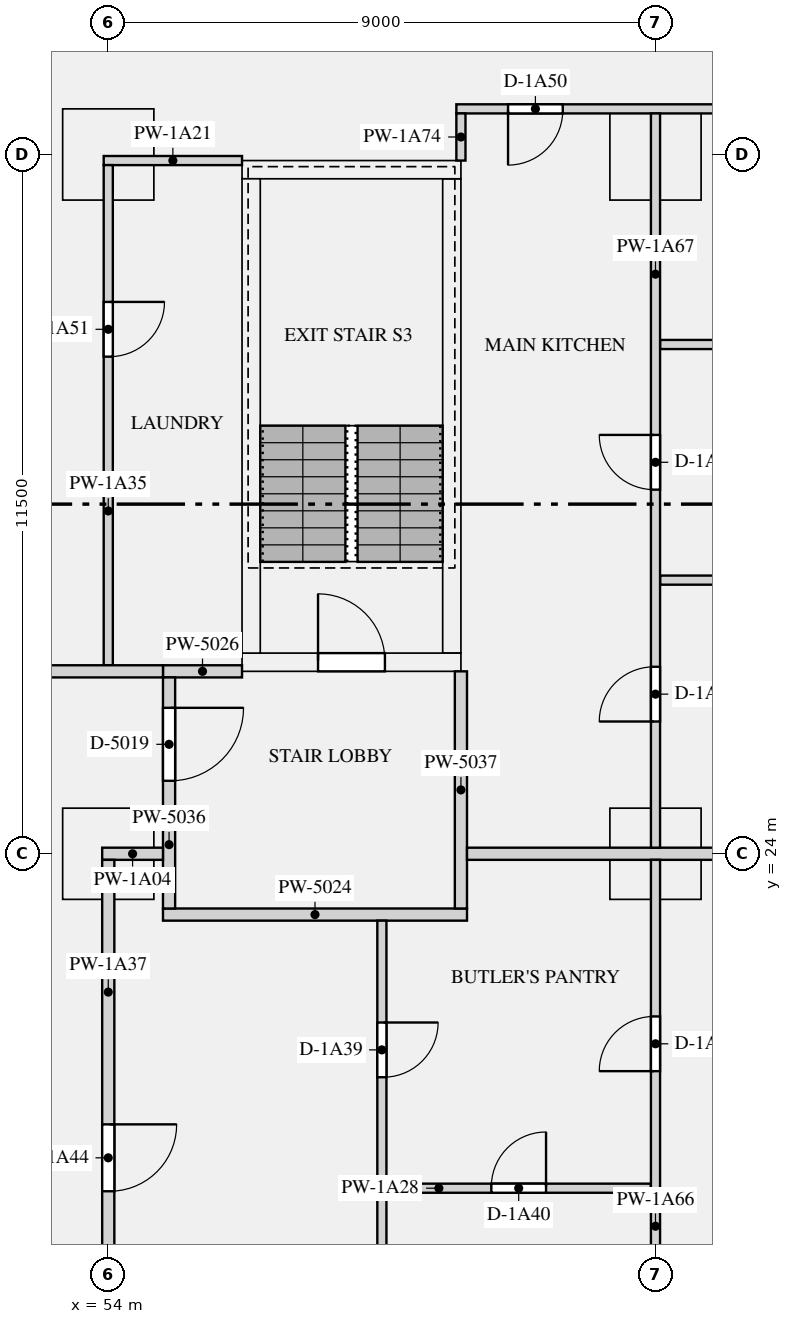
"""IFC4 building model, lengths in metres.
Left out: names, types, materials, properties, quantities, classifications, styles, units other than length and angle.
Written with IfcOpenShell. Run it as: python <this file> out.ifc"""

import sys

from ifc_helpers import new_model, si_unit, direction, frame, frame_2d, origin, origin_2d, place, context, subcontext, project, spatial, rectangle, extrude, element, fill, save


model = new_model("IFC4")
c1 = context("Model", 3, precision=1e-05, world=origin(), true_north=direction((0.0, 1.0)))
c2 = subcontext(c1, "Body", "Model", "MODEL_VIEW")
j1 = project(units=[si_unit("LENGTHUNIT", "METRE"), si_unit("PLANEANGLEUNIT", "RADIAN")], contexts=[c1])
p1 = place(None, origin())
s1 = spatial("IfcSite", under=j1, at=p1, CompositionType="ELEMENT")
p2 = place(p1, origin())
s2 = spatial("IfcBuilding", under=s1, at=p2, CompositionType="ELEMENT")
p3 = place(p2, frame((0.0, 0.0, 19.5)))
s3 = spatial("IfcBuildingStorey", under=s2, at=p3, CompositionType="ELEMENT", Elevation=19.5)
for number, where, z_axis, x_axis in (
    (1, (54.0, 24.0, 0.0), (0.0, 0.0, 1.0), (1.0, 0.0, 0.0)),
    (2, (63.0, 24.0, 0.0), (0.0, 0.0, 1.0), (1.0, 0.0, 0.0)),
    (3, (54.0, 35.5, 0.0), (0.0, 0.0, 1.0), (1.0, 0.0, 0.0)),
    (4, (63.0, 35.5, 0.0), (0.0, 0.0, 1.0), (1.0, 0.0, 0.0)),
):
    element("IfcColumn", number, at=place(p3, frame(where, z_axis=z_axis, x_axis=x_axis)), inside=s3, PredefinedType="COLUMN", context=c2, shape_type="SweptSolid", body=[
        extrude(rectangle(XDim=1.5, YDim=1.5, at=origin_2d()), origin(), (0.0, 0.0, 1.0), 3.15),
    ])
p4 = place(p3, frame((56.2, 27.15, 0.0), z_axis=(0.0, 0.0, 1.0), x_axis=(1.0, 0.0, 0.0)))
e5 = element("IfcWall", 5, at=p4, inside=s3, PredefinedType="SHEAR", context=c2, shape_type="SweptSolid", body=[
    extrude(rectangle(XDim=3.6, YDim=0.3, at=frame_2d((1.8, 0.0))), origin(), (0.0, 0.0, 1.0), 3.15),
])
p5 = place(p4, frame((1.25, 0.0, 0.0)))
e6 = element("IfcOpeningElement", 6, at=p5, cuts=e5, PredefinedType="OPENING", context=c2, shape_type="SweptSolid", body=[
    extrude(rectangle(XDim=1.1, YDim=2.1, at=frame_2d((0.55, 1.05))), frame((0.0, 0.16, 0.0), z_axis=(0.0, -1.0, 0.0), x_axis=(1.0, 0.0, 0.0)), (0.0, 0.0, 1.0), 0.32),
])
p6 = place(p3, frame((56.2, 35.25, 0.0), z_axis=(0.0, 0.0, 1.0), x_axis=(1.0, 0.0, 0.0)))
e7 = element("IfcWall", 7, at=p6, inside=s3, PredefinedType="SHEAR", context=c2, shape_type="SweptSolid", body=[
    extrude(rectangle(XDim=3.6, YDim=0.3, at=frame_2d((1.8, 0.0))), origin(), (0.0, 0.0, 1.0), 3.15),
])
for number, where, z_axis, x_axis in (
    (8, (56.35, 27.3, 0.0), (0.0, 0.0, 1.0), (0.0, 1.0, 0.0)),
    (9, (59.65, 27.3, 0.0), (0.0, 0.0, 1.0), (0.0, 1.0, 0.0)),
):
    element("IfcWall", number, at=place(p3, frame(where, z_axis=z_axis, x_axis=x_axis)), inside=s3, PredefinedType="SHEAR", context=c2, shape_type="SweptSolid", body=[
        extrude(rectangle(XDim=7.8, YDim=0.3, at=frame_2d((3.9, 0.0))), origin(), (0.0, 0.0, 1.0), 3.15),
    ])
p7 = place(p3, frame((54.9, 23.0, 0.0), z_axis=(0.0, 0.0, 1.0), x_axis=(1.0, 0.0, 0.0)))
e10 = element("IfcWall", 10, at=p7, inside=s3, PredefinedType="PARTITIONING", context=c2, shape_type="SweptSolid", body=[
    extrude(rectangle(XDim=5.0, YDim=0.2, at=frame_2d((2.5, 0.0))), origin(), (0.0, 0.0, 1.0), 2.83),
])
p8 = place(p3, frame((54.9, 27.0, 0.0), z_axis=(0.0, 0.0, 1.0), x_axis=(1.0, 0.0, 0.0)))
e11 = element("IfcWall", 11, at=p8, inside=s3, PredefinedType="PARTITIONING", context=c2, shape_type="SweptSolid", body=[
    extrude(rectangle(XDim=1.3, YDim=0.2, at=frame_2d((0.65, 0.0))), origin(), (0.0, 0.0, 1.0), 2.83),
])
p9 = place(p3, frame((55.0, 23.1, 0.0), z_axis=(0.0, 0.0, 1.0), x_axis=(0.0, 1.0, 0.0)))
e12 = element("IfcWall", 12, at=p9, inside=s3, PredefinedType="PARTITIONING", context=c2, shape_type="SweptSolid", body=[
    extrude(rectangle(XDim=3.8, YDim=0.2, at=frame_2d((1.9, 0.0))), origin(), (0.0, 0.0, 1.0), 2.83),
])
p10 = place(p9, frame((2.1, 0.0, 0.0)))
e13 = element("IfcOpeningElement", 13, at=p10, cuts=e12, PredefinedType="OPENING", context=c2, shape_type="SweptSolid", body=[
    extrude(rectangle(XDim=1.2, YDim=2.1, at=frame_2d((0.6, 1.05))), frame((0.0, 0.11, 0.0), z_axis=(0.0, -1.0, 0.0), x_axis=(1.0, 0.0, 0.0)), (0.0, 0.0, 1.0), 0.22),
])
p11 = place(p3, frame((59.8, 23.1, 0.0), z_axis=(0.0, 0.0, 1.0), x_axis=(0.0, 1.0, 0.0)))
e14 = element("IfcWall", 14, at=p11, inside=s3, PredefinedType="PARTITIONING", context=c2, shape_type="SweptSolid", body=[
    extrude(rectangle(XDim=3.9, YDim=0.2, at=frame_2d((1.95, 0.0))), origin(), (0.0, 0.0, 1.0), 2.83),
])
p12 = place(p3, frame((53.9, 24.0, 0.0), z_axis=(0.0, 0.0, 1.0), x_axis=(1.0, 0.0, 0.0)))
e15 = element("IfcWall", 15, at=p12, inside=s3, PredefinedType="PARTITIONING", context=c2, shape_type="SweptSolid", body=[
    extrude(rectangle(XDim=1.0, YDim=0.2, at=frame_2d((0.5, 0.0))), origin(), (0.0, 0.0, 1.0), 2.83),
])
p13 = place(p3, frame((59.9, 24.0, 0.0), z_axis=(0.0, 0.0, 1.0), x_axis=(1.0, 0.0, 0.0)))
e16 = element("IfcWall", 16, at=p13, inside=s3, PredefinedType="PARTITIONING", context=c2, shape_type="SweptSolid", body=[
    extrude(rectangle(XDim=13.3, YDim=0.2, at=frame_2d((6.65, 0.0))), origin(), (0.0, 0.0, 1.0), 2.83),
])
p14 = place(p3, frame((47.9, 27.0, 0.0), z_axis=(0.0, 0.0, 1.0), x_axis=(1.0, 0.0, 0.0)))
e17 = element("IfcWall", 17, at=p14, inside=s3, PredefinedType="PARTITIONING", context=c2, shape_type="SweptSolid", body=[
    extrude(rectangle(XDim=7.0, YDim=0.2, at=frame_2d((3.5, 0.0))), origin(), (0.0, 0.0, 1.0), 2.83),
])
p15 = place(p3, frame((63.075, 32.375, 0.0), z_axis=(0.0, 0.0, 1.0), x_axis=(1.0, 0.0, 0.0)))
e18 = element("IfcWall", 18, at=p15, inside=s3, PredefinedType="PARTITIONING", context=c2, shape_type="SweptSolid", body=[
    extrude(rectangle(XDim=12.625, YDim=0.15, at=frame_2d((6.312, 0.0))), origin(), (0.0, 0.0, 1.0), 2.83),
])
p16 = place(p15, frame((5.6, 0.0, 0.0)))
e19 = element("IfcOpeningElement", 19, at=p16, cuts=e18, PredefinedType="OPENING", context=c2, shape_type="SweptSolid", body=[
    extrude(rectangle(XDim=1.5, YDim=2.1, at=frame_2d((0.75, 1.05))), frame((0.0, 0.085, 0.0), z_axis=(0.0, -1.0, 0.0), x_axis=(1.0, 0.0, 0.0)), (0.0, 0.0, 1.0), 0.17),
])
p17 = place(p3, frame((59.725, 36.25, 0.0), z_axis=(0.0, 0.0, 1.0), x_axis=(1.0, 0.0, 0.0)))
e20 = element("IfcWall", 20, at=p17, inside=s3, PredefinedType="PARTITIONING", context=c2, shape_type="SweptSolid", body=[
    extrude(rectangle(XDim=15.975, YDim=0.15, at=frame_2d((7.987, 0.0))), origin(), (0.0, 0.0, 1.0), 2.83),
])
p18 = place(p17, frame((7.025, 0.0, 0.0)))
e21 = element("IfcOpeningElement", 21, at=p18, cuts=e20, PredefinedType="OPENING", context=c2, shape_type="SweptSolid", body=[
    extrude(rectangle(XDim=1.5, YDim=2.1, at=frame_2d((0.75, 1.05))), frame((0.0, 0.085, 0.0), z_axis=(0.0, -1.0, 0.0), x_axis=(1.0, 0.0, 0.0)), (0.0, 0.0, 1.0), 0.17),
])
p19 = place(p17, frame((0.85, 0.0, 0.0)))
e22 = element("IfcOpeningElement", 22, at=p19, cuts=e20, PredefinedType="OPENING", context=c2, shape_type="SweptSolid", body=[
    extrude(rectangle(XDim=0.9, YDim=2.1, at=frame_2d((0.45, 1.05))), frame((0.0, 0.085, 0.0), z_axis=(0.0, -1.0, 0.0), x_axis=(1.0, 0.0, 0.0)), (0.0, 0.0, 1.0), 0.17),
])
p20 = place(p3, frame((53.925, 35.4, 0.0), z_axis=(0.0, 0.0, 1.0), x_axis=(1.0, 0.0, 0.0)))
e23 = element("IfcWall", 23, at=p20, inside=s3, PredefinedType="PARTITIONING", context=c2, shape_type="SweptSolid", body=[
    extrude(rectangle(XDim=2.275, YDim=0.15, at=frame_2d((1.137, 0.0))), origin(), (0.0, 0.0, 1.0), 2.83),
])
p21 = place(p3, frame((58.575, 18.5, 0.0), z_axis=(0.0, 0.0, 1.0), x_axis=(1.0, 0.0, 0.0)))
e24 = element("IfcWall", 24, at=p21, inside=s3, PredefinedType="PARTITIONING", context=c2, shape_type="SweptSolid", body=[
    extrude(rectangle(XDim=4.35, YDim=0.15, at=frame_2d((2.175, 0.0))), origin(), (0.0, 0.0, 1.0), 2.83),
])
p22 = place(p21, frame((1.725, 0.0, 0.0)))
e25 = element("IfcOpeningElement", 25, at=p22, cuts=e24, PredefinedType="OPENING", context=c2, shape_type="SweptSolid", body=[
    extrude(rectangle(XDim=0.9, YDim=2.1, at=frame_2d((0.45, 1.05))), frame((0.0, 0.085, 0.0), z_axis=(0.0, -1.0, 0.0), x_axis=(1.0, 0.0, 0.0)), (0.0, 0.0, 1.0), 0.17),
])
p23 = place(p3, frame((63.075, 28.5, 0.0), z_axis=(0.0, 0.0, 1.0), x_axis=(1.0, 0.0, 0.0)))
e26 = element("IfcWall", 26, at=p23, inside=s3, PredefinedType="PARTITIONING", context=c2, shape_type="SweptSolid", body=[
    extrude(rectangle(XDim=10.125, YDim=0.15, at=frame_2d((5.062, 0.0))), origin(), (0.0, 0.0, 1.0), 2.83),
])
p24 = place(p23, frame((4.35, 0.0, 0.0)))
e27 = element("IfcOpeningElement", 27, at=p24, cuts=e26, PredefinedType="OPENING", context=c2, shape_type="SweptSolid", body=[
    extrude(rectangle(XDim=1.5, YDim=2.1, at=frame_2d((0.75, 1.05))), frame((0.0, 0.085, 0.0), z_axis=(0.0, -1.0, 0.0), x_axis=(1.0, 0.0, 0.0)), (0.0, 0.0, 1.0), 0.17),
])
p25 = place(p3, frame((54.0, 27.1, 0.0), z_axis=(0.0, 0.0, 1.0), x_axis=(0.0, 1.0, 0.0)))
e28 = element("IfcWall", 28, at=p25, inside=s3, PredefinedType="PARTITIONING", context=c2, shape_type="SweptSolid", body=[
    extrude(rectangle(XDim=8.225, YDim=0.15, at=frame_2d((4.112, 0.0))), origin(), (0.0, 0.0, 1.0), 2.83),
])
p26 = place(p25, frame((5.075, 0.0, 0.0)))
e29 = element("IfcOpeningElement", 29, at=p26, cuts=e28, PredefinedType="OPENING", context=c2, shape_type="SweptSolid", body=[
    extrude(rectangle(XDim=0.9, YDim=2.1, at=frame_2d((0.45, 1.05))), frame((0.0, 0.085, 0.0), z_axis=(0.0, -1.0, 0.0), x_axis=(1.0, 0.0, 0.0)), (0.0, 0.0, 1.0), 0.17),
])
p27 = place(p3, frame((54.0, 16.1, 0.0), z_axis=(0.0, 0.0, 1.0), x_axis=(0.0, 1.0, 0.0)))
e30 = element("IfcWall", 30, at=p27, inside=s3, PredefinedType="PARTITIONING", context=c2, shape_type="SweptSolid", body=[
    extrude(rectangle(XDim=7.8, YDim=0.2, at=frame_2d((3.9, 0.0))), origin(), (0.0, 0.0, 1.0), 2.83),
])
p28 = place(p27, frame((2.35, 0.0, 0.0)))
e31 = element("IfcOpeningElement", 31, at=p28, cuts=e30, PredefinedType="OPENING", context=c2, shape_type="SweptSolid", body=[
    extrude(rectangle(XDim=1.1, YDim=2.1, at=frame_2d((0.55, 1.05))), frame((0.0, 0.11, 0.0), z_axis=(0.0, -1.0, 0.0), x_axis=(1.0, 0.0, 0.0)), (0.0, 0.0, 1.0), 0.22),
])
p29 = place(p3, frame((58.5, 8.575, 0.0), z_axis=(0.0, 0.0, 1.0), x_axis=(0.0, 1.0, 0.0)))
e32 = element("IfcWall", 32, at=p29, inside=s3, PredefinedType="PARTITIONING", context=c2, shape_type="SweptSolid", body=[
    extrude(rectangle(XDim=14.325, YDim=0.15, at=frame_2d((7.163, 0.0))), origin(), (0.0, 0.0, 1.0), 2.83),
])
p30 = place(p29, frame((6.475, 0.0, 0.0)))
e33 = element("IfcOpeningElement", 33, at=p30, cuts=e32, PredefinedType="OPENING", context=c2, shape_type="SweptSolid", body=[
    extrude(rectangle(XDim=0.9, YDim=2.1, at=frame_2d((0.45, 1.05))), frame((0.0, 0.085, 0.0), z_axis=(0.0, -1.0, 0.0), x_axis=(1.0, 0.0, 0.0)), (0.0, 0.0, 1.0), 0.17),
])
p31 = place(p29, frame((11.75, 0.0, 0.0)))
e34 = element("IfcOpeningElement", 34, at=p31, cuts=e32, PredefinedType="OPENING", context=c2, shape_type="SweptSolid", body=[
    extrude(rectangle(XDim=0.9, YDim=2.1, at=frame_2d((0.45, 1.05))), frame((0.0, 0.085, 0.0), z_axis=(0.0, -1.0, 0.0), x_axis=(1.0, 0.0, 0.0)), (0.0, 0.0, 1.0), 0.17),
])
p32 = place(p3, frame((63.0, 12.575, 0.0), z_axis=(0.0, 0.0, 1.0), x_axis=(0.0, 1.0, 0.0)))
e35 = element("IfcWall", 35, at=p32, inside=s3, PredefinedType="PARTITIONING", context=c2, shape_type="SweptSolid", body=[
    extrude(rectangle(XDim=11.325, YDim=0.15, at=frame_2d((5.663, 0.0))), origin(), (0.0, 0.0, 1.0), 2.83),
])
p33 = place(p32, frame((1.85, 0.0, 0.0)))
e36 = element("IfcOpeningElement", 36, at=p33, cuts=e35, PredefinedType="OPENING", context=c2, shape_type="SweptSolid", body=[
    extrude(rectangle(XDim=0.9, YDim=2.1, at=frame_2d((0.45, 1.05))), frame((0.0, 0.085, 0.0), z_axis=(0.0, -1.0, 0.0), x_axis=(1.0, 0.0, 0.0)), (0.0, 0.0, 1.0), 0.17),
])
p34 = place(p32, frame((7.85, 0.0, 0.0)))
e37 = element("IfcOpeningElement", 37, at=p34, cuts=e35, PredefinedType="OPENING", context=c2, shape_type="SweptSolid", body=[
    extrude(rectangle(XDim=0.9, YDim=2.1, at=frame_2d((0.45, 1.05))), frame((0.0, 0.085, 0.0), z_axis=(0.0, -1.0, 0.0), x_axis=(1.0, 0.0, 0.0)), (0.0, 0.0, 1.0), 0.17),
])
p35 = place(p3, frame((63.0, 24.1, 0.0), z_axis=(0.0, 0.0, 1.0), x_axis=(0.0, 1.0, 0.0)))
e38 = element("IfcWall", 38, at=p35, inside=s3, PredefinedType="PARTITIONING", context=c2, shape_type="SweptSolid", body=[
    extrude(rectangle(XDim=12.075, YDim=0.15, at=frame_2d((6.038, 0.0))), origin(), (0.0, 0.0, 1.0), 2.83),
])
p36 = place(p35, frame((5.888, 0.0, 0.0)))
e39 = element("IfcOpeningElement", 39, at=p36, cuts=e38, PredefinedType="OPENING", context=c2, shape_type="SweptSolid", body=[
    extrude(rectangle(XDim=0.9, YDim=2.1, at=frame_2d((0.45, 1.05))), frame((0.0, 0.085, 0.0), z_axis=(0.0, -1.0, 0.0), x_axis=(1.0, 0.0, 0.0)), (0.0, 0.0, 1.0), 0.17),
])
p37 = place(p35, frame((2.075, 0.0, 0.0)))
e40 = element("IfcOpeningElement", 40, at=p37, cuts=e38, PredefinedType="OPENING", context=c2, shape_type="SweptSolid", body=[
    extrude(rectangle(XDim=0.9, YDim=2.1, at=frame_2d((0.45, 1.05))), frame((0.0, 0.085, 0.0), z_axis=(0.0, -1.0, 0.0), x_axis=(1.0, 0.0, 0.0)), (0.0, 0.0, 1.0), 0.17),
])
p38 = place(p3, frame((59.8, 35.4, 0.0), z_axis=(0.0, 0.0, 1.0), x_axis=(0.0, 1.0, 0.0)))
e41 = element("IfcWall", 41, at=p38, inside=s3, PredefinedType="PARTITIONING", context=c2, shape_type="SweptSolid", body=[
    extrude(rectangle(XDim=0.775, YDim=0.15, at=frame_2d((0.388, 0.0))), origin(), (0.0, 0.0, 1.0), 2.83),
])
p39 = place(p5, origin())
e42 = element("IfcDoor", 42, at=p39, inside=s3, OperationType="SINGLE_SWING_LEFT", PredefinedType="DOOR", context=c2, shape_type="SweptSolid", body=[
    extrude(rectangle(XDim=1.1, YDim=2.1, at=frame_2d((0.55, 1.05))), frame((0.0, 0.025, 0.0), z_axis=(0.0, -1.0, 0.0), x_axis=(1.0, 0.0, 0.0)), (0.0, 0.0, 1.0), 0.05),
])
fill(e6, e42)
p40 = place(p10, frame((1.2, 0.0, 0.0), z_axis=(0.0, 0.0, 1.0), x_axis=(-1.0, 0.0, 0.0)))
e43 = element("IfcDoor", 43, at=p40, inside=s3, OperationType="SINGLE_SWING_LEFT", PredefinedType="DOOR", context=c2, shape_type="SweptSolid", body=[
    extrude(rectangle(XDim=1.2, YDim=2.1, at=frame_2d((0.6, 1.05))), frame((0.0, 0.025, 0.0), z_axis=(0.0, -1.0, 0.0), x_axis=(1.0, 0.0, 0.0)), (0.0, 0.0, 1.0), 0.05),
])
fill(e13, e43)
p41 = place(p31, frame((0.9, 0.0, 0.0), z_axis=(0.0, 0.0, 1.0), x_axis=(-1.0, 0.0, 0.0)))
e44 = element("IfcDoor", 44, at=p41, inside=s3, OperationType="SINGLE_SWING_LEFT", PredefinedType="DOOR", context=c2, shape_type="SweptSolid", body=[
    extrude(rectangle(XDim=0.9, YDim=2.1, at=frame_2d((0.45, 1.05))), frame((0.0, 0.025, 0.0), z_axis=(0.0, -1.0, 0.0), x_axis=(1.0, 0.0, 0.0)), (0.0, 0.0, 1.0), 0.05),
])
fill(e34, e44)
p42 = place(p22, origin())
e45 = element("IfcDoor", 45, at=p42, inside=s3, OperationType="SINGLE_SWING_RIGHT", PredefinedType="DOOR", context=c2, shape_type="SweptSolid", body=[
    extrude(rectangle(XDim=0.9, YDim=2.1, at=frame_2d((0.45, 1.05))), frame((0.0, 0.025, 0.0), z_axis=(0.0, -1.0, 0.0), x_axis=(1.0, 0.0, 0.0)), (0.0, 0.0, 1.0), 0.05),
])
fill(e25, e45)
p43 = place(p34, origin())
e46 = element("IfcDoor", 46, at=p43, inside=s3, OperationType="SINGLE_SWING_LEFT", PredefinedType="DOOR", context=c2, shape_type="SweptSolid", body=[
    extrude(rectangle(XDim=0.9, YDim=2.1, at=frame_2d((0.45, 1.05))), frame((0.0, 0.025, 0.0), z_axis=(0.0, -1.0, 0.0), x_axis=(1.0, 0.0, 0.0)), (0.0, 0.0, 1.0), 0.05),
])
fill(e37, e46)
p44 = place(p28, frame((1.1, 0.0, 0.0), z_axis=(0.0, 0.0, 1.0), x_axis=(-1.0, 0.0, 0.0)))
e47 = element("IfcDoor", 47, at=p44, inside=s3, OperationType="SINGLE_SWING_LEFT", PredefinedType="DOOR", context=c2, shape_type="SweptSolid", body=[
    extrude(rectangle(XDim=1.1, YDim=2.1, at=frame_2d((0.55, 1.05))), frame((0.0, 0.025, 0.0), z_axis=(0.0, -1.0, 0.0), x_axis=(1.0, 0.0, 0.0)), (0.0, 0.0, 1.0), 0.05),
])
fill(e31, e47)
p45 = place(p36, origin())
e48 = element("IfcDoor", 48, at=p45, inside=s3, OperationType="SINGLE_SWING_RIGHT", PredefinedType="DOOR", context=c2, shape_type="SweptSolid", body=[
    extrude(rectangle(XDim=0.9, YDim=2.1, at=frame_2d((0.45, 1.05))), frame((0.0, 0.025, 0.0), z_axis=(0.0, -1.0, 0.0), x_axis=(1.0, 0.0, 0.0)), (0.0, 0.0, 1.0), 0.05),
])
fill(e39, e48)
p46 = place(p37, origin())
e49 = element("IfcDoor", 49, at=p46, inside=s3, OperationType="SINGLE_SWING_LEFT", PredefinedType="DOOR", context=c2, shape_type="SweptSolid", body=[
    extrude(rectangle(XDim=0.9, YDim=2.1, at=frame_2d((0.45, 1.05))), frame((0.0, 0.025, 0.0), z_axis=(0.0, -1.0, 0.0), x_axis=(1.0, 0.0, 0.0)), (0.0, 0.0, 1.0), 0.05),
])
fill(e40, e49)
p47 = place(p19, frame((0.9, 0.0, 0.0), z_axis=(0.0, 0.0, 1.0), x_axis=(-1.0, 0.0, 0.0)))
e50 = element("IfcDoor", 50, at=p47, inside=s3, OperationType="SINGLE_SWING_RIGHT", PredefinedType="DOOR", context=c2, shape_type="SweptSolid", body=[
    extrude(rectangle(XDim=0.9, YDim=2.1, at=frame_2d((0.45, 1.05))), frame((0.0, 0.025, 0.0), z_axis=(0.0, -1.0, 0.0), x_axis=(1.0, 0.0, 0.0)), (0.0, 0.0, 1.0), 0.05),
])
fill(e22, e50)
p48 = place(p26, frame((0.9, 0.0, 0.0), z_axis=(0.0, 0.0, 1.0), x_axis=(-1.0, 0.0, 0.0)))
e51 = element("IfcDoor", 51, at=p48, inside=s3, OperationType="SINGLE_SWING_LEFT", PredefinedType="DOOR", context=c2, shape_type="SweptSolid", body=[
    extrude(rectangle(XDim=0.9, YDim=2.1, at=frame_2d((0.45, 1.05))), frame((0.0, 0.025, 0.0), z_axis=(0.0, -1.0, 0.0), x_axis=(1.0, 0.0, 0.0)), (0.0, 0.0, 1.0), 0.05),
])
fill(e29, e51)
save(model, sys.argv[1])
